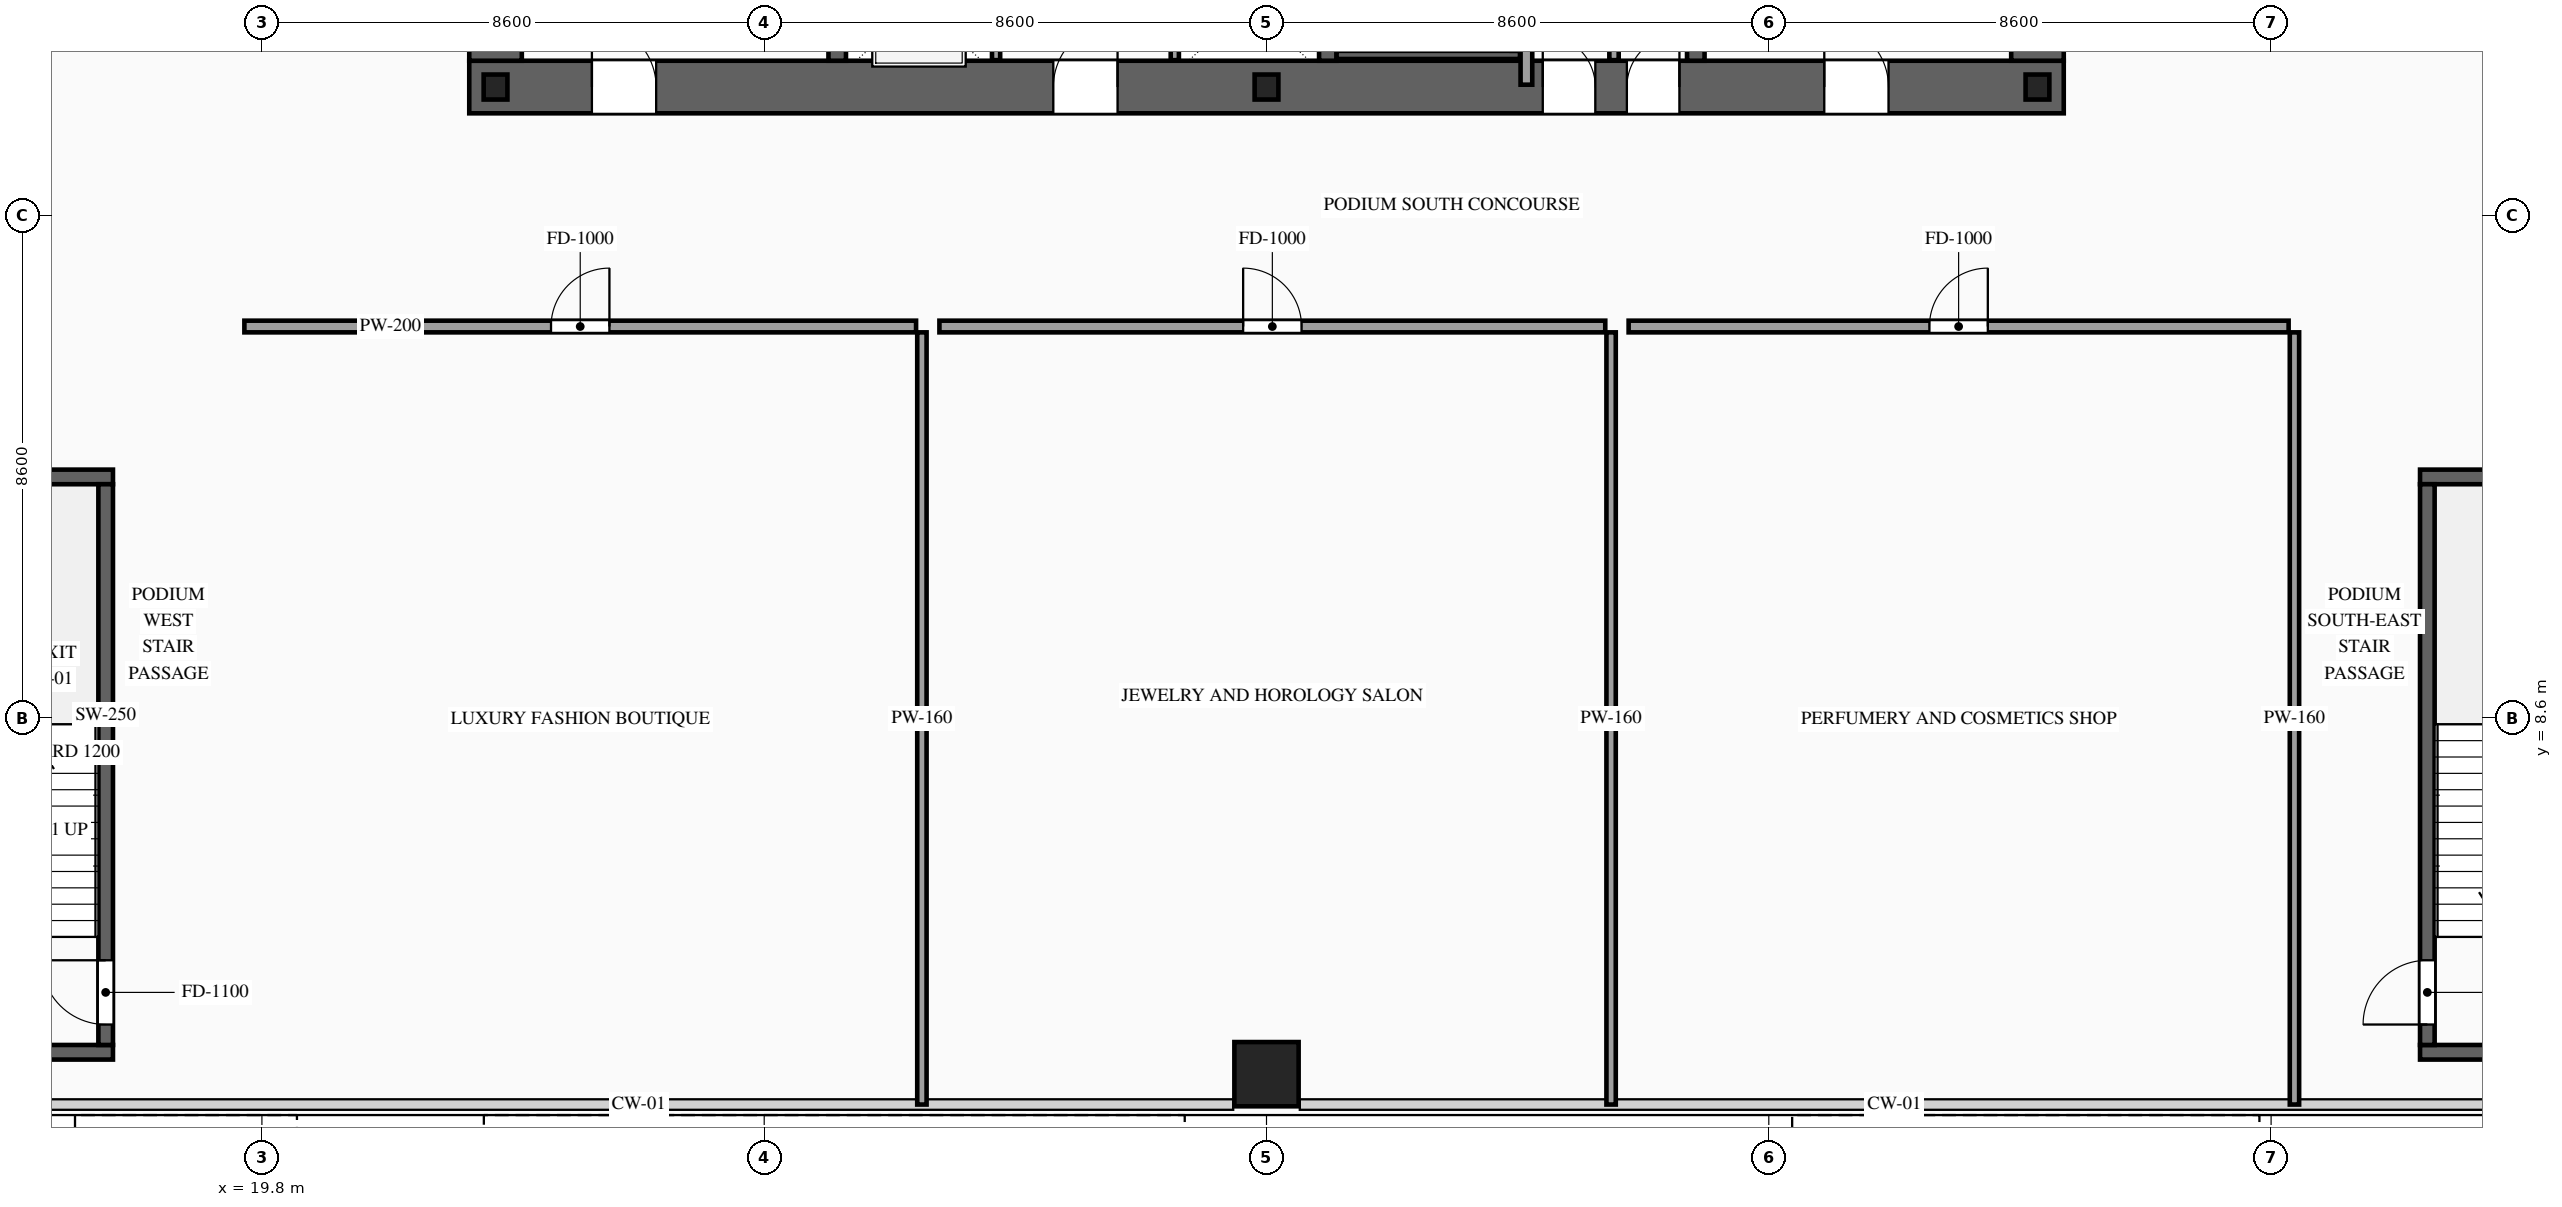
"""IFC4 building model, lengths in metres.
Left out: names, types, materials, properties, quantities, classifications, styles, units other than length and angle.
Written with IfcOpenShell. Run it as: python <this file> out.ifc"""

import sys

from ifc_helpers import new_model, si_unit, direction, frame, frame_2d, origin, origin_2d, place, context, subcontext, project, spatial, rectangle, i_section, extrude, source, transform, mapped, element, fill, save


model = new_model("IFC4")
c1 = context("Model", 3, precision=1e-05, world=origin(), true_north=direction((0.0, 1.0)))
c2 = subcontext(c1, "Body", "Model", "MODEL_VIEW")
j1 = project(units=[si_unit("LENGTHUNIT", "METRE"), si_unit("PLANEANGLEUNIT", "RADIAN")], contexts=[c1])
p1 = place(None, origin())
s1 = spatial("IfcSite", under=j1, at=p1, CompositionType="ELEMENT")
p2 = place(p1, origin())
s2 = spatial("IfcBuilding", under=s1, at=p2, CompositionType="ELEMENT")
p3 = place(p2, frame((0.0, 0.0, 5.4)))
s3 = spatial("IfcBuildingStorey", under=s2, at=p3, CompositionType="ELEMENT", Elevation=5.4)
p4 = place(p3, frame((23.35, 19.4, 0.0), z_axis=(0.0, 0.0, 1.0), x_axis=(1.0, 0.0, 0.0)))
e1 = element("IfcWall", 1, at=p4, inside=s3, PredefinedType="SHEAR", context=c2, shape_type="SweptSolid", body=[
    extrude(rectangle(XDim=27.3, YDim=0.9, at=frame_2d((13.65, 0.0))), origin(), (0.0, 0.0, 1.0), 4.8),
])
p5 = place(p4, frame((2.1, 0.0, 0.0)))
e2 = element("IfcOpeningElement", 2, at=p5, cuts=e1, PredefinedType="OPENING", context=c2, shape_type="SweptSolid", body=[
    extrude(rectangle(XDim=1.1, YDim=2.2, at=frame_2d((0.55, 1.1))), frame((0.0, 0.465, 0.0), z_axis=(0.0, -1.0, 0.0), x_axis=(1.0, 0.0, 0.0)), (0.0, 0.0, 1.0), 0.93),
])
p6 = place(p4, frame((10.0, 0.0, 0.0)))
e3 = element("IfcOpeningElement", 3, at=p6, cuts=e1, PredefinedType="OPENING", context=c2, shape_type="SweptSolid", body=[
    extrude(rectangle(XDim=1.1, YDim=2.2, at=frame_2d((0.55, 1.1))), frame((0.0, 0.465, 0.0), z_axis=(0.0, -1.0, 0.0), x_axis=(1.0, 0.0, 0.0)), (0.0, 0.0, 1.0), 0.93),
])
p7 = place(p4, frame((23.2, 0.0, 0.0)))
e4 = element("IfcOpeningElement", 4, at=p7, cuts=e1, PredefinedType="OPENING", context=c2, shape_type="SweptSolid", body=[
    extrude(rectangle(XDim=1.1, YDim=2.2, at=frame_2d((0.55, 1.1))), frame((0.0, 0.465, 0.0), z_axis=(0.0, -1.0, 0.0), x_axis=(1.0, 0.0, 0.0)), (0.0, 0.0, 1.0), 0.93),
])
p8 = place(p4, frame((19.82, 0.0, 0.0)))
e5 = element("IfcOpeningElement", 5, at=p8, cuts=e1, PredefinedType="OPENING", context=c2, shape_type="SweptSolid", body=[
    extrude(rectangle(XDim=0.9, YDim=2.15, at=frame_2d((0.45, 1.075))), frame((0.0, 0.465, 0.0), z_axis=(0.0, -1.0, 0.0), x_axis=(1.0, 0.0, 0.0)), (0.0, 0.0, 1.0), 0.93),
])
p9 = place(p4, frame((18.38, 0.0, 0.0)))
e6 = element("IfcOpeningElement", 6, at=p9, cuts=e1, PredefinedType="OPENING", context=c2, shape_type="SweptSolid", body=[
    extrude(rectangle(XDim=0.9, YDim=2.15, at=frame_2d((0.45, 1.075))), frame((0.0, 0.465, 0.0), z_axis=(0.0, -1.0, 0.0), x_axis=(1.0, 0.0, 0.0)), (0.0, 0.0, 1.0), 0.93),
])
m1 = source(origin(), c2, "Body", "SweptSolid", [
    extrude(rectangle(XDim=11.9, YDim=0.9, at=frame_2d((5.95, 0.0))), origin(), (0.0, 0.0, 1.0), 4.8),
])
for number, where, z_axis, x_axis in (
    (7, (23.8, 19.85, 0.0), (0.0, 0.0, 1.0), (0.0, 1.0, 0.0)),
    (8, (50.2, 19.85, 0.0), (0.0, 0.0, 1.0), (0.0, 1.0, 0.0)),
):
    element("IfcWall", number, at=place(p3, frame(where, z_axis=z_axis, x_axis=x_axis)), inside=s3, PredefinedType="SHEAR", context=c2, shape_type="MappedRepresentation", body=[
        mapped(m1, transform((0.0, 0.0, 0.0), scale=1.0)),
    ])
m2 = source(origin(), c2, "Body", "SweptSolid", [
    extrude(rectangle(XDim=11.9, YDim=0.3, at=frame_2d((5.95, 0.0))), origin(), (0.0, 0.0, 1.0), 4.8),
])
for number, where, z_axis, x_axis in (
    (9, (29.65, 19.85, 0.0), (0.0, 0.0, 1.0), (0.0, 1.0, 0.0)),
    (10, (38.05, 19.85, 0.0), (0.0, 0.0, 1.0), (0.0, 1.0, 0.0)),
    (11, (44.35, 19.85, 0.0), (0.0, 0.0, 1.0), (0.0, 1.0, 0.0)),
):
    element("IfcWall", number, at=place(p3, frame(where, z_axis=z_axis, x_axis=x_axis)), inside=s3, PredefinedType="SOLIDWALL", context=c2, shape_type="MappedRepresentation", body=[
        mapped(m2, transform((0.0, 0.0, 0.0), scale=1.0)),
    ])
m3 = source(origin(), c2, "Body", "SweptSolid", [
    extrude(i_section(OverallWidth=0.407, OverallDepth=0.428, WebThickness=0.02, FlangeThickness=0.035, at=origin_2d()), origin(), (0.0, 0.0, 1.0), 4.8),
])
for number, where, z_axis, x_axis in (
    (12, (23.8, 19.4, 0.0), (0.0, 0.0, 1.0), (1.0, 0.0, 0.0)),
    (13, (37.0, 19.4, 0.0), (0.0, 0.0, 1.0), (1.0, 0.0, 0.0)),
    (14, (50.2, 19.4, 0.0), (0.0, 0.0, 1.0), (1.0, 0.0, 0.0)),
):
    element("IfcColumn", number, at=place(p3, frame(where, z_axis=z_axis, x_axis=x_axis)), inside=s3, PredefinedType="COLUMN", context=c2, shape_type="MappedRepresentation", body=[
        mapped(m3, transform((0.0, 0.0, 0.0), scale=1.0)),
    ])
m4 = source(origin(), c2, "Body", "SweptSolid", [
    extrude(rectangle(XDim=1.1, YDim=1.1, at=origin_2d()), origin(), (0.0, 0.0, 1.0), 4.8),
])
p10 = place(p3, frame((37.0, 2.5, 0.0), z_axis=(0.0, 0.0, 1.0), x_axis=(1.0, 0.0, 0.0)))
e15 = element("IfcColumn", 15, at=p10, inside=s3, PredefinedType="COLUMN", context=c2, shape_type="MappedRepresentation", body=[
    mapped(m4, transform((0.0, 0.0, 0.0), scale=1.0)),
])
p11 = place(p3, frame((32.37, 19.86, 0.0), z_axis=(0.0, 0.0, 1.0), x_axis=(0.0, 1.0, 0.0)))
e16 = element("IfcWall", 16, at=p11, inside=s3, PredefinedType="SOLIDWALL", context=c2, shape_type="SweptSolid", body=[
    extrude(rectangle(XDim=2.04, YDim=0.14, at=frame_2d((1.02, 0.0))), origin(), (0.0, 0.0, 1.0), 4.52),
])
p12 = place(p11, frame((0.47, 0.0, 0.0)))
e17 = element("IfcOpeningElement", 17, at=p12, cuts=e16, PredefinedType="OPENING", context=c2, shape_type="SweptSolid", body=[
    extrude(rectangle(XDim=1.1, YDim=2.2, at=frame_2d((0.55, 1.1))), frame((0.0, 0.085, 0.0), z_axis=(0.0, -1.0, 0.0), x_axis=(1.0, 0.0, 0.0)), (0.0, 0.0, 1.0), 0.17),
])
m5 = source(origin(), c2, "Body", "SweptSolid", [
    extrude(rectangle(XDim=2.04, YDim=0.14, at=frame_2d((1.02, 0.0))), origin(), (0.0, 0.0, 1.0), 4.52),
])
p13 = place(p3, frame((35.43, 19.86, 0.0), z_axis=(0.0, 0.0, 1.0), x_axis=(0.0, 1.0, 0.0)))
e18 = element("IfcWall", 18, at=p13, inside=s3, PredefinedType="SOLIDWALL", context=c2, shape_type="MappedRepresentation", body=[
    mapped(m5, transform((0.0, 0.0, 0.0), scale=1.0)),
])
m6 = source(origin(), c2, "Body", "SweptSolid", [
    extrude(rectangle(XDim=3.14, YDim=0.14, at=frame_2d((1.57, 0.0))), origin(), (0.0, 0.0, 1.0), 4.52),
])
p14 = place(p3, frame((38.2, 19.95, 0.0), z_axis=(0.0, 0.0, 1.0), x_axis=(1.0, 0.0, 0.0)))
e19 = element("IfcWall", 19, at=p14, inside=s3, PredefinedType="SOLIDWALL", context=c2, shape_type="MappedRepresentation", body=[
    mapped(m6, transform((0.0, 0.0, 0.0), scale=1.0)),
])
m7 = source(origin(), c2, "Body", "SweptSolid", [
    extrude(rectangle(XDim=4.3, YDim=0.25, at=frame_2d((2.15, 0.0))), origin(), (0.0, 0.0, 1.0), 4.52),
])
for number, where, z_axis, x_axis in (
    (20, (12.95, 2.875, 0.0), (0.0, 0.0, 1.0), (1.0, 0.0, 0.0)),
    (21, (12.95, 12.725, 0.0), (0.0, 0.0, 1.0), (1.0, 0.0, 0.0)),
):
    element("IfcWall", number, at=place(p3, frame(where, z_axis=z_axis, x_axis=x_axis)), inside=s3, PredefinedType="SOLIDWALL", context=c2, shape_type="MappedRepresentation", body=[
        mapped(m7, transform((0.0, 0.0, 0.0), scale=1.0)),
    ])
p15 = place(p3, frame((17.125, 3.0, 0.0), z_axis=(0.0, 0.0, 1.0), x_axis=(0.0, 1.0, 0.0)))
e22 = element("IfcWall", 22, at=p15, inside=s3, PredefinedType="SOLIDWALL", context=c2, shape_type="SweptSolid", body=[
    extrude(rectangle(XDim=9.6, YDim=0.25, at=frame_2d((4.8, 0.0))), origin(), (0.0, 0.0, 1.0), 4.52),
])
p16 = place(p15, frame((0.35, 0.0, 0.0)))
e23 = element("IfcOpeningElement", 23, at=p16, cuts=e22, PredefinedType="OPENING", context=c2, shape_type="SweptSolid", body=[
    extrude(rectangle(XDim=1.1, YDim=2.2, at=frame_2d((0.55, 1.1))), frame((0.0, 0.14, 0.0), z_axis=(0.0, -1.0, 0.0), x_axis=(1.0, 0.0, 0.0)), (0.0, 0.0, 1.0), 0.28),
])
for number, where, z_axis, x_axis in (
    (24, (56.75, 2.875, 0.0), (0.0, 0.0, 1.0), (1.0, 0.0, 0.0)),
    (25, (56.75, 12.725, 0.0), (0.0, 0.0, 1.0), (1.0, 0.0, 0.0)),
):
    element("IfcWall", number, at=place(p3, frame(where, z_axis=z_axis, x_axis=x_axis)), inside=s3, PredefinedType="SOLIDWALL", context=c2, shape_type="MappedRepresentation", body=[
        mapped(m7, transform((0.0, 0.0, 0.0), scale=1.0)),
    ])
p17 = place(p3, frame((56.875, 3.0, 0.0), z_axis=(0.0, 0.0, 1.0), x_axis=(0.0, 1.0, 0.0)))
e26 = element("IfcWall", 26, at=p17, inside=s3, PredefinedType="SOLIDWALL", context=c2, shape_type="SweptSolid", body=[
    extrude(rectangle(XDim=9.6, YDim=0.25, at=frame_2d((4.8, 0.0))), origin(), (0.0, 0.0, 1.0), 4.52),
])
p18 = place(p17, frame((0.35, 0.0, 0.0)))
e27 = element("IfcOpeningElement", 27, at=p18, cuts=e26, PredefinedType="OPENING", context=c2, shape_type="SweptSolid", body=[
    extrude(rectangle(XDim=1.1, YDim=2.2, at=frame_2d((0.55, 1.1))), frame((0.0, 0.14, 0.0), z_axis=(0.0, -1.0, 0.0), x_axis=(1.0, 0.0, 0.0)), (0.0, 0.0, 1.0), 0.28),
])
m8 = source(origin(), c2, "Body", "SweptSolid", [
    extrude(rectangle(XDim=1.34, YDim=0.16, at=frame_2d((0.67, 0.0))), origin(), (0.0, 0.0, 1.0), 4.52),
])
p19 = place(p3, frame((42.95, 19.86, 0.0), z_axis=(0.0, 0.0, 1.0), x_axis=(0.0, 1.0, 0.0)))
e28 = element("IfcWall", 28, at=p19, inside=s3, PredefinedType="PARTITIONING", context=c2, shape_type="MappedRepresentation", body=[
    mapped(m8, transform((0.0, 0.0, 0.0), scale=1.0)),
])
m9 = source(origin(), c2, "Body", "SweptSolid", [
    extrude(rectangle(XDim=6.51, YDim=0.2, at=frame_2d((3.255, 0.0))), origin(), (0.0, 0.0, 1.0), 4.52),
])
p20 = place(p3, frame((41.45, 19.44, 0.0), z_axis=(0.0, 0.0, 1.0), x_axis=(0.0, 1.0, 0.0)))
e29 = element("IfcWall", 29, at=p20, inside=s3, PredefinedType="PARTITIONING", context=c2, shape_type="MappedRepresentation", body=[
    mapped(m9, transform((0.0, 0.0, 0.0), scale=1.0)),
])
p21 = place(p3, frame((19.5, 15.3, 0.0), z_axis=(0.0, 0.0, 1.0), x_axis=(1.0, 0.0, 0.0)))
e30 = element("IfcWall", 30, at=p21, inside=s3, PredefinedType="PARTITIONING", context=c2, shape_type="SweptSolid", body=[
    extrude(rectangle(XDim=11.5, YDim=0.2, at=frame_2d((5.75, 0.0))), origin(), (0.0, 0.0, 1.0), 4.52),
])
p22 = place(p21, frame((5.25, 0.0, 0.0)))
e31 = element("IfcOpeningElement", 31, at=p22, cuts=e30, PredefinedType="OPENING", context=c2, shape_type="SweptSolid", body=[
    extrude(rectangle(XDim=1.0, YDim=2.2, at=frame_2d((0.5, 1.1))), frame((0.0, 0.115, 0.0), z_axis=(0.0, -1.0, 0.0), x_axis=(1.0, 0.0, 0.0)), (0.0, 0.0, 1.0), 0.23),
])
m10 = source(origin(), c2, "Body", "SweptSolid", [
    extrude(rectangle(XDim=13.22, YDim=0.16, at=frame_2d((6.61, 0.0))), origin(), (0.0, 0.0, 1.0), 4.52),
])
p23 = place(p3, frame((31.1, 1.98, 0.0), z_axis=(0.0, 0.0, 1.0), x_axis=(0.0, 1.0, 0.0)))
e32 = element("IfcWall", 32, at=p23, inside=s3, PredefinedType="PARTITIONING", context=c2, shape_type="MappedRepresentation", body=[
    mapped(m10, transform((0.0, 0.0, 0.0), scale=1.0)),
])
p24 = place(p3, frame((31.4, 15.3, 0.0), z_axis=(0.0, 0.0, 1.0), x_axis=(1.0, 0.0, 0.0)))
e33 = element("IfcWall", 33, at=p24, inside=s3, PredefinedType="PARTITIONING", context=c2, shape_type="SweptSolid", body=[
    extrude(rectangle(XDim=11.4, YDim=0.2, at=frame_2d((5.7, 0.0))), origin(), (0.0, 0.0, 1.0), 4.52),
])
p25 = place(p24, frame((5.2, 0.0, 0.0)))
e34 = element("IfcOpeningElement", 34, at=p25, cuts=e33, PredefinedType="OPENING", context=c2, shape_type="SweptSolid", body=[
    extrude(rectangle(XDim=1.0, YDim=2.2, at=frame_2d((0.5, 1.1))), frame((0.0, 0.115, 0.0), z_axis=(0.0, -1.0, 0.0), x_axis=(1.0, 0.0, 0.0)), (0.0, 0.0, 1.0), 0.23),
])
p26 = place(p3, frame((42.9, 1.98, 0.0), z_axis=(0.0, 0.0, 1.0), x_axis=(0.0, 1.0, 0.0)))
e35 = element("IfcWall", 35, at=p26, inside=s3, PredefinedType="PARTITIONING", context=c2, shape_type="MappedRepresentation", body=[
    mapped(m10, transform((0.0, 0.0, 0.0), scale=1.0)),
])
p27 = place(p3, frame((43.2, 15.3, 0.0), z_axis=(0.0, 0.0, 1.0), x_axis=(1.0, 0.0, 0.0)))
e36 = element("IfcWall", 36, at=p27, inside=s3, PredefinedType="PARTITIONING", context=c2, shape_type="SweptSolid", body=[
    extrude(rectangle(XDim=11.3, YDim=0.2, at=frame_2d((5.65, 0.0))), origin(), (0.0, 0.0, 1.0), 4.52),
])
p28 = place(p27, frame((5.15, 0.0, 0.0)))
e37 = element("IfcOpeningElement", 37, at=p28, cuts=e36, PredefinedType="OPENING", context=c2, shape_type="SweptSolid", body=[
    extrude(rectangle(XDim=1.0, YDim=2.2, at=frame_2d((0.5, 1.1))), frame((0.0, 0.115, 0.0), z_axis=(0.0, -1.0, 0.0), x_axis=(1.0, 0.0, 0.0)), (0.0, 0.0, 1.0), 0.23),
])
p29 = place(p3, frame((54.6, 1.98, 0.0), z_axis=(0.0, 0.0, 1.0), x_axis=(0.0, 1.0, 0.0)))
e38 = element("IfcWall", 38, at=p29, inside=s3, PredefinedType="PARTITIONING", context=c2, shape_type="MappedRepresentation", body=[
    mapped(m10, transform((0.0, 0.0, 0.0), scale=1.0)),
])
m11 = source(origin(), c2, "Body", "SweptSolid", [
    extrude(rectangle(XDim=1.1, YDim=2.2, at=frame_2d((0.55, 1.1))), frame((0.0, 0.025, 0.0), z_axis=(0.0, -1.0, 0.0), x_axis=(1.0, 0.0, 0.0)), (0.0, 0.0, 1.0), 0.05),
])
p30 = place(p16, origin())
e39 = element("IfcDoor", 39, at=p30, inside=s3, OperationType="SINGLE_SWING_RIGHT", PredefinedType="DOOR", context=c2, shape_type="MappedRepresentation", body=[
    mapped(m11, transform((0.0, 0.0, 0.0), scale=1.0)),
])
fill(e23, e39)
p31 = place(p18, origin())
e40 = element("IfcDoor", 40, at=p31, inside=s3, OperationType="SINGLE_SWING_LEFT", PredefinedType="DOOR", context=c2, shape_type="MappedRepresentation", body=[
    mapped(m11, transform((0.0, 0.0, 0.0), scale=1.0)),
])
fill(e27, e40)
p32 = place(p5, origin())
e41 = element("IfcDoor", 41, at=p32, inside=s3, OperationType="SINGLE_SWING_LEFT", PredefinedType="DOOR", context=c2, shape_type="MappedRepresentation", body=[
    mapped(m11, transform((0.0, 0.0, 0.0), scale=1.0)),
])
fill(e2, e41)
p33 = place(p6, origin())
e42 = element("IfcDoor", 42, at=p33, inside=s3, OperationType="SINGLE_SWING_RIGHT", PredefinedType="DOOR", context=c2, shape_type="MappedRepresentation", body=[
    mapped(m11, transform((0.0, 0.0, 0.0), scale=1.0)),
])
fill(e3, e42)
p34 = place(p7, origin())
e43 = element("IfcDoor", 43, at=p34, inside=s3, OperationType="SINGLE_SWING_LEFT", PredefinedType="DOOR", context=c2, shape_type="MappedRepresentation", body=[
    mapped(m11, transform((0.0, 0.0, 0.0), scale=1.0)),
])
fill(e4, e43)
m12 = source(origin(), c2, "Body", "SweptSolid", [
    extrude(rectangle(XDim=0.9, YDim=2.15, at=frame_2d((0.45, 1.075))), frame((0.0, 0.025, 0.0), z_axis=(0.0, -1.0, 0.0), x_axis=(1.0, 0.0, 0.0)), (0.0, 0.0, 1.0), 0.05),
])
p35 = place(p8, origin())
e44 = element("IfcDoor", 44, at=p35, inside=s3, OperationType="SINGLE_SWING_RIGHT", PredefinedType="DOOR", context=c2, shape_type="MappedRepresentation", body=[
    mapped(m12, transform((0.0, 0.0, 0.0), scale=1.0)),
])
fill(e5, e44)
p36 = place(p9, origin())
e45 = element("IfcDoor", 45, at=p36, inside=s3, OperationType="SINGLE_SWING_LEFT", PredefinedType="DOOR", context=c2, shape_type="MappedRepresentation", body=[
    mapped(m12, transform((0.0, 0.0, 0.0), scale=1.0)),
])
fill(e6, e45)
m13 = source(origin(), c2, "Body", "SweptSolid", [
    extrude(rectangle(XDim=1.0, YDim=2.2, at=frame_2d((0.5, 1.1))), frame((0.0, 0.025, 0.0), z_axis=(0.0, -1.0, 0.0), x_axis=(1.0, 0.0, 0.0)), (0.0, 0.0, 1.0), 0.05),
])
p37 = place(p22, origin())
e46 = element("IfcDoor", 46, at=p37, inside=s3, OperationType="SINGLE_SWING_RIGHT", PredefinedType="DOOR", context=c2, shape_type="MappedRepresentation", body=[
    mapped(m13, transform((0.0, 0.0, 0.0), scale=1.0)),
])
fill(e31, e46)
p38 = place(p25, origin())
e47 = element("IfcDoor", 47, at=p38, inside=s3, OperationType="SINGLE_SWING_LEFT", PredefinedType="DOOR", context=c2, shape_type="MappedRepresentation", body=[
    mapped(m13, transform((0.0, 0.0, 0.0), scale=1.0)),
])
fill(e34, e47)
p39 = place(p28, origin())
e48 = element("IfcDoor", 48, at=p39, inside=s3, OperationType="SINGLE_SWING_RIGHT", PredefinedType="DOOR", context=c2, shape_type="MappedRepresentation", body=[
    mapped(m13, transform((0.0, 0.0, 0.0), scale=1.0)),
])
fill(e37, e48)
save(model, sys.argv[1])
